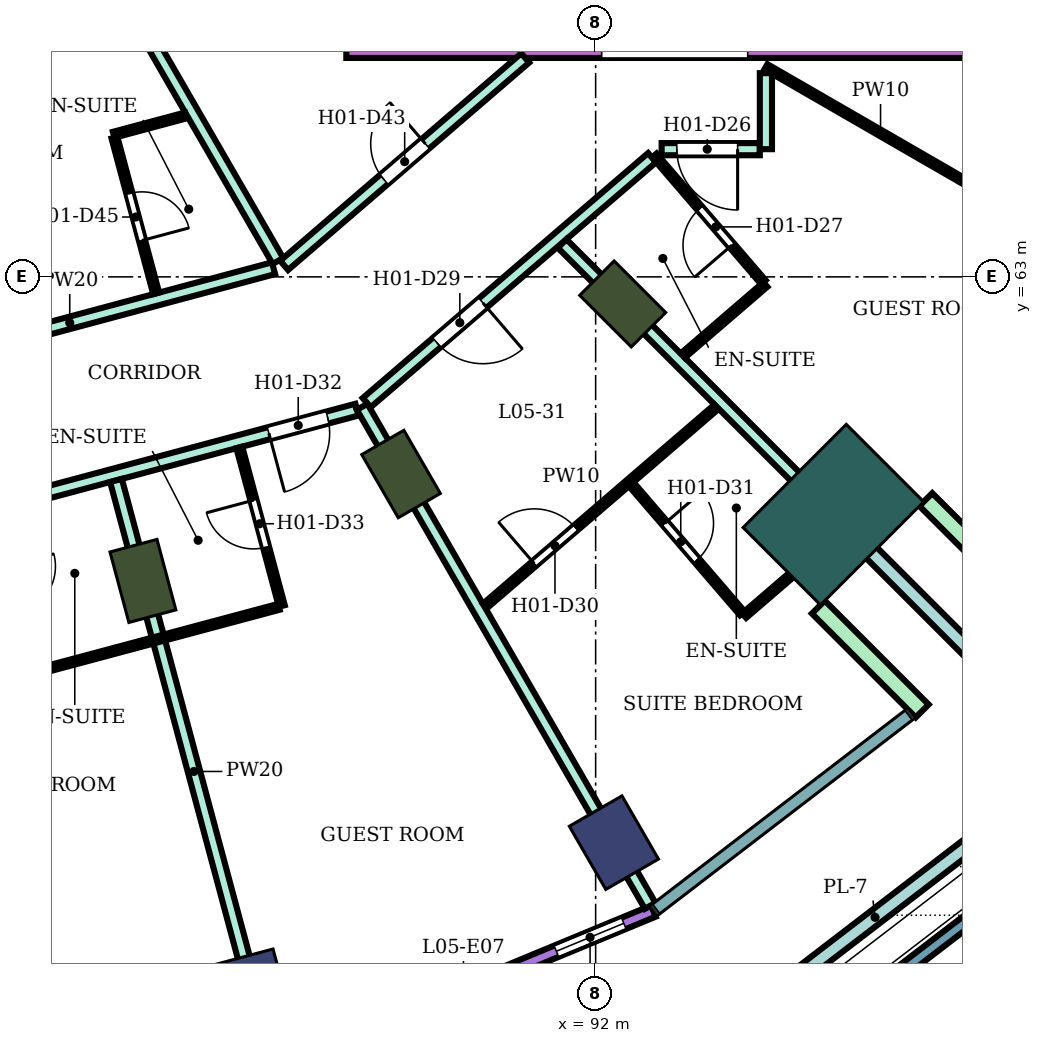
"""IFC4 building model, lengths in metres.
Left out: names, types, materials, properties, quantities, classifications, styles, units other than length and angle.
Written with IfcOpenShell. Run it as: python <this file> out.ifc"""

import sys

from ifc_helpers import new_model, si_unit, direction, frame, frame_2d, origin, origin_2d, place, context, subcontext, project, spatial, rectangle, extrude, element, fill, save


model = new_model("IFC4")
c1 = context("Model", 3, precision=1e-05, world=origin(), true_north=direction((0.0, 1.0)))
c2 = subcontext(c1, "Body", "Model", "MODEL_VIEW")
j1 = project(units=[si_unit("LENGTHUNIT", "METRE"), si_unit("PLANEANGLEUNIT", "RADIAN")], contexts=[c1])
p1 = place(None, origin())
s1 = spatial("IfcSite", under=j1, at=p1, CompositionType="ELEMENT")
p2 = place(p1, origin())
s2 = spatial("IfcBuilding", under=s1, at=p2, CompositionType="ELEMENT")
p3 = place(p2, frame((0.0, 0.0, 28.8)))
s3 = spatial("IfcBuildingStorey", under=s2, at=p3, CompositionType="ELEMENT", Elevation=28.8)
for number, where, z_axis, x_axis in (
    (1, (86.367, 51.238, 0.0), (0.0, 0.0, 1.0), (0.259, -0.966, 0.0)),
    (2, (92.3, 53.696, 0.0), (0.0, 0.0, 1.0), (0.5, -0.866, 0.0)),
):
    element("IfcColumn", number, at=place(p3, frame(where, z_axis=z_axis, x_axis=x_axis)), inside=s3, PredefinedType="COLUMN", context=c2, shape_type="SweptSolid", body=[
        extrude(rectangle(XDim=1.2, YDim=1.0, at=origin_2d()), origin(), (0.0, 0.0, 1.0), 3.8),
    ])
for number, where, z_axis, x_axis in (
    (3, (84.555, 58.0, 0.0), (0.0, 0.0, 1.0), (0.259, -0.966, 0.0)),
    (4, (88.8, 59.758, 0.0), (0.0, 0.0, 1.0), (0.5, -0.866, 0.0)),
    (5, (92.445, 62.555, 0.0), (0.0, 0.0, 1.0), (0.707, -0.707, 0.0)),
):
    element("IfcColumn", number, at=place(p3, frame(where, z_axis=z_axis, x_axis=x_axis)), inside=s3, PredefinedType="COLUMN", context=c2, shape_type="SweptSolid", body=[
        extrude(rectangle(XDim=1.2, YDim=0.8, at=origin_2d()), origin(), (0.0, 0.0, 1.0), 3.8),
    ])
p4 = place(p3, frame((95.91, 59.09, 0.0), z_axis=(0.0, 0.0, 1.0), x_axis=(0.707106781187, -0.707106781187, 0.0)))
e6 = element("IfcColumn", 6, at=p4, inside=s3, PredefinedType="COLUMN", context=c2, shape_type="SweptSolid", body=[
    extrude(rectangle(XDim=1.8, YDim=2.4, at=origin_2d()), origin(), (0.0, 0.0, 1.0), 3.8),
])
p5 = place(p3, frame((87.9, 67.0, 0.0), z_axis=(0.0, 0.0, 1.0), x_axis=(1.0, 0.0, 0.0)))
e7 = element("IfcWall", 7, at=p5, inside=s3, PredefinedType="SHEAR", context=c2, shape_type="SweptSolid", body=[
    extrude(rectangle(XDim=14.7, YDim=0.8, at=frame_2d((7.35, 0.0))), origin(), (0.0, 0.0, 1.0), 3.48),
])
p6 = place(p5, frame((4.2, 0.0, 0.0)))
e8 = element("IfcOpeningElement", 8, at=p6, cuts=e7, PredefinedType="OPENING", context=c2, shape_type="SweptSolid", body=[
    extrude(rectangle(XDim=2.4, YDim=2.4, at=frame_2d((1.2, 1.2))), frame((0.0, 0.41, 0.0), z_axis=(0.0, -1.0, 0.0), x_axis=(1.0, 0.0, 0.0)), (0.0, 0.0, 1.0), 0.82),
])
p7 = place(p3, frame((86.703, 49.983, 0.0), z_axis=(0.0, 0.0, 1.0), x_axis=(0.923875115043, 0.382694096902, 0.0)))
e9 = element("IfcWall", 9, at=p7, inside=s3, PredefinedType="NOTDEFINED", context=c2, shape_type="SweptSolid", body=[
    extrude(rectangle(XDim=6.761, YDim=0.2, at=frame_2d((3.38, 0.0))), origin(), (0.0, 0.0, 1.0), 3.8),
])
p8 = place(p7, frame((0.527, 0.0, 0.9)))
e10 = element("IfcOpeningElement", 10, at=p8, cuts=e9, PredefinedType="OPENING", context=c2, shape_type="SweptSolid", body=[
    extrude(rectangle(XDim=1.2, YDim=2.4, at=frame_2d((0.6, 1.2))), frame((0.0, 0.11, 0.0), z_axis=(0.0, -1.0, 0.0), x_axis=(1.0, 0.0, 0.0)), (0.0, 0.0, 1.0), 0.22),
])
p9 = place(p7, frame((2.48, 0.0, 0.0)))
e11 = element("IfcOpeningElement", 11, at=p9, cuts=e9, PredefinedType="OPENING", context=c2, shape_type="SweptSolid", body=[
    extrude(rectangle(XDim=1.8, YDim=2.4, at=frame_2d((0.9, 1.2))), frame((0.0, 0.11, 0.0), z_axis=(0.0, -1.0, 0.0), x_axis=(1.0, 0.0, 0.0)), (0.0, 0.0, 1.0), 0.22),
])
p10 = place(p7, frame((5.034, 0.0, 0.9)))
e12 = element("IfcOpeningElement", 12, at=p10, cuts=e9, PredefinedType="OPENING", context=c2, shape_type="SweptSolid", body=[
    extrude(rectangle(XDim=1.2, YDim=2.4, at=frame_2d((0.6, 1.2))), frame((0.0, 0.11, 0.0), z_axis=(0.0, -1.0, 0.0), x_axis=(1.0, 0.0, 0.0)), (0.0, 0.0, 1.0), 0.22),
])
for number, where, z_axis, x_axis in (
    (13, (95.662, 57.57, 0.0), (0.0, 0.0, 1.0), (0.707, -0.707, 0.0)),
    (14, (97.43, 59.338, 0.0), (0.0, 0.0, 1.0), (0.707, -0.707, 0.0)),
):
    element("IfcWall", number, at=place(p3, frame(where, z_axis=z_axis, x_axis=x_axis)), inside=s3, PredefinedType="NOTDEFINED", context=c2, shape_type="SweptSolid", body=[
        extrude(rectangle(XDim=2.416, YDim=0.3, at=frame_2d((1.208, 0.0))), origin(), (0.0, 0.0, 1.0), 3.8),
    ])
p11 = place(p3, frame((100.635, 54.346, 0.0), z_axis=(0.0, 0.0, 1.0), x_axis=(-0.793367808682, -0.608742572971, 0.0)))
e15 = element("IfcWall", 15, at=p11, inside=s3, PredefinedType="PARAPET", context=c2, shape_type="SweptSolid", body=[
    extrude(rectangle(XDim=7.596, YDim=0.2, at=frame_2d((3.798, 0.0))), origin(), (0.0, 0.0, 1.0), 1.1),
])
p12 = place(p3, frame((99.067, 54.365, 0.0), z_axis=(0.0, 0.0, 1.0), x_axis=(-0.793355967101, -0.608758005668, 0.0)))
e16 = element("IfcWall", 16, at=p12, inside=s3, PredefinedType="USERDEFINED", context=c2, shape_type="SweptSolid", body=[
    extrude(rectangle(XDim=6.232, YDim=0.25, at=frame_2d((3.116, 0.0))), origin(), (0.0, 0.0, 1.0), 0.6),
])
p13 = place(p3, frame((99.876, 55.124, 0.0), z_axis=(0.0, 0.0, 1.0), x_axis=(-0.707106781187, 0.707106781187, 0.0)))
e17 = element("IfcWall", 17, at=p13, inside=s3, PredefinedType="USERDEFINED", context=c2, shape_type="SweptSolid", body=[
    extrude(rectangle(XDim=4.909, YDim=0.25, at=frame_2d((2.455, 0.0))), origin(), (0.0, 0.0, 1.0), 0.6),
])
p14 = place(p3, frame((80.0, 58.655, 0.0), z_axis=(0.0, 0.0, 1.0), x_axis=(0.965974635626, 0.258636817424, 0.0)))
e18 = element("IfcWall", 18, at=p14, inside=s3, PredefinedType="PARTITIONING", context=c2, shape_type="SweptSolid", body=[
    extrude(rectangle(XDim=8.36, YDim=0.2, at=frame_2d((4.18, 0.0))), origin(), (0.0, 0.0, 1.0), 3.35),
])
p15 = place(p14, frame((6.86, 0.0, 0.0)))
e19 = element("IfcOpeningElement", 19, at=p15, cuts=e18, PredefinedType="OPENING", context=c2, shape_type="SweptSolid", body=[
    extrude(rectangle(XDim=1.0, YDim=2.1, at=frame_2d((0.5, 1.05))), frame((0.0, 0.11, 0.0), z_axis=(0.0, -1.0, 0.0), x_axis=(1.0, 0.0, 0.0)), (0.0, 0.0, 1.0), 0.22),
])
p16 = place(p14, frame((0.55, 0.0, 0.0)))
e20 = element("IfcOpeningElement", 20, at=p16, cuts=e18, PredefinedType="OPENING", context=c2, shape_type="SweptSolid", body=[
    extrude(rectangle(XDim=1.0, YDim=2.1, at=frame_2d((0.5, 1.05))), frame((0.0, 0.11, 0.0), z_axis=(0.0, -1.0, 0.0), x_axis=(1.0, 0.0, 0.0)), (0.0, 0.0, 1.0), 0.22),
])
p17 = place(p3, frame((80.0, 61.346, 0.0), z_axis=(0.0, 0.0, 1.0), x_axis=(0.965924181808, 0.258825182312, 0.0)))
e21 = element("IfcWall", 21, at=p17, inside=s3, PredefinedType="PARTITIONING", context=c2, shape_type="SweptSolid", body=[
    extrude(rectangle(XDim=6.94, YDim=0.2, at=frame_2d((3.47, 0.0))), origin(), (0.0, 0.0, 1.0), 3.35),
])
p18 = place(p17, frame((0.55, 0.0, 0.0)))
e22 = element("IfcOpeningElement", 22, at=p18, cuts=e21, PredefinedType="OPENING", context=c2, shape_type="SweptSolid", body=[
    extrude(rectangle(XDim=1.0, YDim=2.1, at=frame_2d((0.5, 1.05))), frame((0.0, 0.11, 0.0), z_axis=(0.0, -1.0, 0.0), x_axis=(1.0, 0.0, 0.0)), (0.0, 0.0, 1.0), 0.22),
])
p19 = place(p3, frame((83.848, 68.333, 0.0), z_axis=(0.0, 0.0, 1.0), x_axis=(0.499951054106, -0.866053660865, 0.0)))
e23 = element("IfcWall", 23, at=p19, inside=s3, PredefinedType="PARTITIONING", context=c2, shape_type="SweptSolid", body=[
    extrude(rectangle(XDim=5.855, YDim=0.2, at=frame_2d((2.927, 0.0))), origin(), (0.0, 0.0, 1.0), 3.35),
])
p20 = place(p3, frame((84.112, 59.652, 0.0), z_axis=(0.0, 0.0, 1.0), x_axis=(0.258791091927, -0.965933315886, 0.0)))
e24 = element("IfcWall", 24, at=p20, inside=s3, PredefinedType="PARTITIONING", context=c2, shape_type="SweptSolid", body=[
    extrude(rectangle(XDim=9.909, YDim=0.2, at=frame_2d((4.955, 0.0))), origin(), (0.0, 0.0, 1.0), 3.35),
])
p21 = place(p3, frame((86.877, 63.189, 0.0), z_axis=(0.0, 0.0, 1.0), x_axis=(0.758075808328, 0.652166442581, 0.0)))
e25 = element("IfcWall", 25, at=p21, inside=s3, PredefinedType="PARTITIONING", context=c2, shape_type="SweptSolid", body=[
    extrude(rectangle(XDim=5.23, YDim=0.2, at=frame_2d((2.615, 0.0))), origin(), (0.0, 0.0, 1.0), 3.35),
])
p22 = place(p21, frame((2.165, 0.0, 0.0)))
e26 = element("IfcOpeningElement", 26, at=p22, cuts=e25, PredefinedType="OPENING", context=c2, shape_type="SweptSolid", body=[
    extrude(rectangle(XDim=0.9, YDim=2.1, at=frame_2d((0.45, 1.05))), frame((0.0, 0.11, 0.0), z_axis=(0.0, -1.0, 0.0), x_axis=(1.0, 0.0, 0.0)), (0.0, 0.0, 1.0), 0.22),
])
p23 = place(p3, frame((88.235, 60.931, 0.0), z_axis=(0.0, 0.0, 1.0), x_axis=(0.758799498714, 0.651324282329, 0.0)))
e27 = element("IfcWall", 27, at=p23, inside=s3, PredefinedType="PARTITIONING", context=c2, shape_type="SweptSolid", body=[
    extrude(rectangle(XDim=6.186, YDim=0.2, at=frame_2d((3.093, 0.0))), origin(), (0.0, 0.0, 1.0), 3.35),
])
p24 = place(p23, frame((1.519, 0.0, 0.0)))
e28 = element("IfcOpeningElement", 28, at=p24, cuts=e27, PredefinedType="OPENING", context=c2, shape_type="SweptSolid", body=[
    extrude(rectangle(XDim=1.0, YDim=2.1, at=frame_2d((0.5, 1.05))), frame((0.0, 0.11, 0.0), z_axis=(0.0, -1.0, 0.0), x_axis=(1.0, 0.0, 0.0)), (0.0, 0.0, 1.0), 0.22),
])
p25 = place(p3, frame((88.16, 60.863, 0.0), z_axis=(0.0, 0.0, 1.0), x_axis=(0.499946996988, -0.866056002925, 0.0)))
e29 = element("IfcWall", 29, at=p25, inside=s3, PredefinedType="PARTITIONING", context=c2, shape_type="SweptSolid", body=[
    extrude(rectangle(XDim=9.475, YDim=0.2, at=frame_2d((4.737, 0.0))), origin(), (0.0, 0.0, 1.0), 3.35),
])
p26 = place(p3, frame((91.449, 63.548, 0.0), z_axis=(0.0, 0.0, 1.0), x_axis=(0.706984804638, -0.707228736698, 0.0)))
e30 = element("IfcWall", 30, at=p26, inside=s3, PredefinedType="PARTITIONING", context=c2, shape_type="SweptSolid", body=[
    extrude(rectangle(XDim=7.006, YDim=0.2, at=frame_2d((3.503, 0.0))), origin(), (0.0, 0.0, 1.0), 3.35),
])
p27 = place(p3, frame((93.085, 65.1, 0.0), z_axis=(0.0, 0.0, 1.0), x_axis=(1.0, 0.0, 0.0)))
e31 = element("IfcWall", 31, at=p27, inside=s3, PredefinedType="PARTITIONING", context=c2, shape_type="SweptSolid", body=[
    extrude(rectangle(XDim=1.615, YDim=0.2, at=frame_2d((0.808, 0.0))), origin(), (0.0, 0.0, 1.0), 3.35),
])
p28 = place(p27, frame((0.25, 0.0, 0.0)))
e32 = element("IfcOpeningElement", 32, at=p28, cuts=e31, PredefinedType="OPENING", context=c2, shape_type="SweptSolid", body=[
    extrude(rectangle(XDim=1.0, YDim=2.1, at=frame_2d((0.5, 1.05))), frame((0.0, 0.11, 0.0), z_axis=(0.0, -1.0, 0.0), x_axis=(1.0, 0.0, 0.0)), (0.0, 0.0, 1.0), 0.22),
])
p29 = place(p3, frame((94.8, 65.1, 0.0), z_axis=(0.0, 0.0, 1.0), x_axis=(0.0, 1.0, 0.0)))
e33 = element("IfcWall", 33, at=p29, inside=s3, PredefinedType="PARTITIONING", context=c2, shape_type="SweptSolid", body=[
    extrude(rectangle(XDim=1.25, YDim=0.2, at=frame_2d((0.625, 0.0))), origin(), (0.0, 0.0, 1.0), 3.35),
])
p30 = place(p3, frame((82.782, 56.501, 0.0), z_axis=(0.0, 0.0, 1.0), x_axis=(0.965999228418, 0.258544949083, 0.0)))
e34 = element("IfcWall", 34, at=p30, inside=s3, PredefinedType="PARTITIONING", context=c2, shape_type="SweptSolid", body=[
    extrude(rectangle(XDim=4.15, YDim=0.1, at=frame_2d((2.075, 0.0))), origin(), (0.0, 0.0, 1.0), 3.35),
])
p31 = place(p3, frame((84.087, 65.289, 0.0), z_axis=(0.0, 0.0, 1.0), x_axis=(0.258929459649, -0.965896234037, 0.0)))
e35 = element("IfcWall", 35, at=p31, inside=s3, PredefinedType="PARTITIONING", context=c2, shape_type="SweptSolid", body=[
    extrude(rectangle(XDim=2.65, YDim=0.1, at=frame_2d((1.325, 0.0))), origin(), (0.0, 0.0, 1.0), 3.35),
])
p32 = place(p31, frame((0.95, 0.0, 0.0)))
e36 = element("IfcOpeningElement", 36, at=p32, cuts=e35, PredefinedType="OPENING", context=c2, shape_type="SweptSolid", body=[
    extrude(rectangle(XDim=0.8, YDim=2.1, at=frame_2d((0.4, 1.05))), frame((0.0, 0.06, 0.0), z_axis=(0.0, -1.0, 0.0), x_axis=(1.0, 0.0, 0.0)), (0.0, 0.0, 1.0), 0.12),
])
p33 = place(p3, frame((84.074, 65.337, 0.0), z_axis=(0.0, 0.0, 1.0), x_axis=(0.965914351064, 0.258861867428, 0.0)))
e37 = element("IfcWall", 37, at=p33, inside=s3, PredefinedType="PARTITIONING", context=c2, shape_type="SweptSolid", body=[
    extrude(rectangle(XDim=1.229, YDim=0.1, at=frame_2d((0.615, 0.0))), origin(), (0.0, 0.0, 1.0), 3.35),
])
p34 = place(p3, frame((86.14, 60.196, 0.0), z_axis=(0.0, 0.0, 1.0), x_axis=(0.258945475746, -0.965891940432, 0.0)))
e38 = element("IfcWall", 38, at=p34, inside=s3, PredefinedType="PARTITIONING", context=c2, shape_type="SweptSolid", body=[
    extrude(rectangle(XDim=2.7, YDim=0.1, at=frame_2d((1.35, 0.0))), origin(), (0.0, 0.0, 1.0), 3.35),
])
p35 = place(p34, frame((0.9, 0.0, 0.0)))
e39 = element("IfcOpeningElement", 39, at=p35, cuts=e38, PredefinedType="OPENING", context=c2, shape_type="SweptSolid", body=[
    extrude(rectangle(XDim=0.8, YDim=2.1, at=frame_2d((0.4, 1.05))), frame((0.0, 0.06, 0.0), z_axis=(0.0, -1.0, 0.0), x_axis=(1.0, 0.0, 0.0)), (0.0, 0.0, 1.0), 0.12),
])
p36 = place(p3, frame((90.178, 57.587, 0.0), z_axis=(0.0, 0.0, 1.0), x_axis=(0.758140003227, 0.652091815243, 0.0)))
e40 = element("IfcWall", 40, at=p36, inside=s3, PredefinedType="PARTITIONING", context=c2, shape_type="SweptSolid", body=[
    extrude(rectangle(XDim=5.021, YDim=0.1, at=frame_2d((2.51, 0.0))), origin(), (0.0, 0.0, 1.0), 3.35),
])
p37 = place(p36, frame((1.071, 0.0, 0.0)))
e41 = element("IfcOpeningElement", 41, at=p37, cuts=e40, PredefinedType="OPENING", context=c2, shape_type="SweptSolid", body=[
    extrude(rectangle(XDim=0.9, YDim=2.1, at=frame_2d((0.45, 1.05))), frame((0.0, 0.06, 0.0), z_axis=(0.0, -1.0, 0.0), x_axis=(1.0, 0.0, 0.0)), (0.0, 0.0, 1.0), 0.12),
])
p38 = place(p3, frame((92.585, 59.591, 0.0), z_axis=(0.0, 0.0, 1.0), x_axis=(0.652011200591, -0.758209334092, 0.0)))
e42 = element("IfcWall", 42, at=p38, inside=s3, PredefinedType="PARTITIONING", context=c2, shape_type="SweptSolid", body=[
    extrude(rectangle(XDim=2.8, YDim=0.1, at=frame_2d((1.4, 0.0))), origin(), (0.0, 0.0, 1.0), 3.35),
])
p39 = place(p38, frame((0.85, 0.0, 0.0)))
e43 = element("IfcOpeningElement", 43, at=p39, cuts=e42, PredefinedType="OPENING", context=c2, shape_type="SweptSolid", body=[
    extrude(rectangle(XDim=0.8, YDim=2.1, at=frame_2d((0.4, 1.05))), frame((0.0, 0.06, 0.0), z_axis=(0.0, -1.0, 0.0), x_axis=(1.0, 0.0, 0.0)), (0.0, 0.0, 1.0), 0.12),
])
p40 = place(p3, frame((92.965, 64.997, 0.0), z_axis=(0.0, 0.0, 1.0), x_axis=(0.652069888227, -0.758158862553, 0.0)))
e44 = element("IfcWall", 44, at=p40, inside=s3, PredefinedType="PARTITIONING", context=c2, shape_type="SweptSolid", body=[
    extrude(rectangle(XDim=2.75, YDim=0.1, at=frame_2d((1.375, 0.0))), origin(), (0.0, 0.0, 1.0), 3.35),
])
p41 = place(p40, frame((1.15, 0.0, 0.0)))
e45 = element("IfcOpeningElement", 45, at=p41, cuts=e44, PredefinedType="OPENING", context=c2, shape_type="SweptSolid", body=[
    extrude(rectangle(XDim=0.8, YDim=2.1, at=frame_2d((0.4, 1.05))), frame((0.0, 0.06, 0.0), z_axis=(0.0, -1.0, 0.0), x_axis=(1.0, 0.0, 0.0)), (0.0, 0.0, 1.0), 0.12),
])
p42 = place(p3, frame((93.435, 61.707, 0.0), z_axis=(0.0, 0.0, 1.0), x_axis=(0.758070495124, 0.652172618578, 0.0)))
e46 = element("IfcWall", 46, at=p42, inside=s3, PredefinedType="PARTITIONING", context=c2, shape_type="SweptSolid", body=[
    extrude(rectangle(XDim=1.789, YDim=0.1, at=frame_2d((0.895, 0.0))), origin(), (0.0, 0.0, 1.0), 3.35),
])
p43 = place(p3, frame((94.443, 57.43, 0.0), z_axis=(0.0, 0.0, 1.0), x_axis=(0.757840386328, 0.65243999636, 0.0)))
e47 = element("IfcWall", 47, at=p43, inside=s3, PredefinedType="PARTITIONING", context=c2, shape_type="SweptSolid", body=[
    extrude(rectangle(XDim=2.108, YDim=0.1, at=frame_2d((1.054, 0.0))), origin(), (0.0, 0.0, 1.0), 3.35),
])
p44 = place(p3, frame((94.8, 66.455, 0.0), z_axis=(0.0, 0.0, 1.0), x_axis=(0.86602264145, -0.500004784474, 0.0)))
e48 = element("IfcWall", 48, at=p44, inside=s3, PredefinedType="PARTITIONING", context=c2, shape_type="SweptSolid", body=[
    extrude(rectangle(XDim=8.708, YDim=0.1, at=frame_2d((4.354, 0.0))), origin(), (0.0, 0.0, 1.0), 3.35),
])
p45 = place(p44, frame((3.879, 0.0, 0.0)))
e49 = element("IfcOpeningElement", 49, at=p45, cuts=e48, PredefinedType="OPENING", context=c2, shape_type="SweptSolid", body=[
    extrude(rectangle(XDim=0.9, YDim=2.1, at=frame_2d((0.45, 1.05))), frame((0.0, 0.06, 0.0), z_axis=(0.0, -1.0, 0.0), x_axis=(1.0, 0.0, 0.0)), (0.0, 0.0, 1.0), 0.12),
])
p46 = place(p10, origin())
e50 = element("IfcWindow", 50, at=p46, inside=s3, PartitioningType="SINGLE_PANEL", PredefinedType="WINDOW", context=c2, shape_type="SweptSolid", body=[
    extrude(rectangle(XDim=1.2, YDim=2.4, at=frame_2d((0.6, 1.2))), frame((0.0, 0.03, 0.0), z_axis=(0.0, -1.0, 0.0), x_axis=(1.0, 0.0, 0.0)), (0.0, 0.0, 1.0), 0.06),
])
fill(e12, e50)
p47 = place(p28, frame((1.0, 0.0, 0.0), z_axis=(0.0, 0.0, 1.0), x_axis=(-1.0, 0.0, 0.0)))
e51 = element("IfcDoor", 51, at=p47, inside=s3, OperationType="SINGLE_SWING_LEFT", PredefinedType="DOOR", context=c2, shape_type="SweptSolid", body=[
    extrude(rectangle(XDim=1.0, YDim=2.1, at=frame_2d((0.5, 1.05))), frame((0.0, 0.025, 0.0), z_axis=(0.0, -1.0, 0.0), x_axis=(1.0, 0.0, 0.0)), (0.0, 0.0, 1.0), 0.05),
])
fill(e32, e51)
p48 = place(p41, frame((0.8, 0.0, 0.0), z_axis=(0.0, 0.0, 1.0), x_axis=(-1.0, 0.0, 0.0)))
e52 = element("IfcDoor", 52, at=p48, inside=s3, OperationType="SINGLE_SWING_LEFT", PredefinedType="DOOR", context=c2, shape_type="SweptSolid", body=[
    extrude(rectangle(XDim=0.8, YDim=2.1, at=frame_2d((0.4, 1.05))), frame((0.0, 0.025, 0.0), z_axis=(0.0, -1.0, 0.0), x_axis=(1.0, 0.0, 0.0)), (0.0, 0.0, 1.0), 0.05),
])
fill(e45, e52)
p49 = place(p24, frame((1.0, 0.0, 0.0), z_axis=(0.0, 0.0, 1.0), x_axis=(-1.0, 0.0, 0.0)))
e53 = element("IfcDoor", 53, at=p49, inside=s3, OperationType="SINGLE_SWING_LEFT", PredefinedType="DOOR", context=c2, shape_type="SweptSolid", body=[
    extrude(rectangle(XDim=1.0, YDim=2.1, at=frame_2d((0.5, 1.05))), frame((0.0, 0.025, 0.0), z_axis=(0.0, -1.0, 0.0), x_axis=(1.0, 0.0, 0.0)), (0.0, 0.0, 1.0), 0.05),
])
fill(e28, e53)
p50 = place(p37, origin())
e54 = element("IfcDoor", 54, at=p50, inside=s3, OperationType="SINGLE_SWING_LEFT", PredefinedType="DOOR", context=c2, shape_type="SweptSolid", body=[
    extrude(rectangle(XDim=0.9, YDim=2.1, at=frame_2d((0.45, 1.05))), frame((0.0, 0.025, 0.0), z_axis=(0.0, -1.0, 0.0), x_axis=(1.0, 0.0, 0.0)), (0.0, 0.0, 1.0), 0.05),
])
fill(e41, e54)
p51 = place(p39, origin())
e55 = element("IfcDoor", 55, at=p51, inside=s3, OperationType="SINGLE_SWING_LEFT", PredefinedType="DOOR", context=c2, shape_type="SweptSolid", body=[
    extrude(rectangle(XDim=0.8, YDim=2.1, at=frame_2d((0.4, 1.05))), frame((0.0, 0.025, 0.0), z_axis=(0.0, -1.0, 0.0), x_axis=(1.0, 0.0, 0.0)), (0.0, 0.0, 1.0), 0.05),
])
fill(e43, e55)
p52 = place(p15, frame((1.0, 0.0, 0.0), z_axis=(0.0, 0.0, 1.0), x_axis=(-1.0, 0.0, 0.0)))
e56 = element("IfcDoor", 56, at=p52, inside=s3, OperationType="SINGLE_SWING_RIGHT", PredefinedType="DOOR", context=c2, shape_type="SweptSolid", body=[
    extrude(rectangle(XDim=1.0, YDim=2.1, at=frame_2d((0.5, 1.05))), frame((0.0, 0.025, 0.0), z_axis=(0.0, -1.0, 0.0), x_axis=(1.0, 0.0, 0.0)), (0.0, 0.0, 1.0), 0.05),
])
fill(e19, e56)
p53 = place(p35, frame((0.8, 0.0, 0.0), z_axis=(0.0, 0.0, 1.0), x_axis=(-1.0, 0.0, 0.0)))
e57 = element("IfcDoor", 57, at=p53, inside=s3, OperationType="SINGLE_SWING_RIGHT", PredefinedType="DOOR", context=c2, shape_type="SweptSolid", body=[
    extrude(rectangle(XDim=0.8, YDim=2.1, at=frame_2d((0.4, 1.05))), frame((0.0, 0.025, 0.0), z_axis=(0.0, -1.0, 0.0), x_axis=(1.0, 0.0, 0.0)), (0.0, 0.0, 1.0), 0.05),
])
fill(e39, e57)
p54 = place(p22, origin())
e58 = element("IfcDoor", 58, at=p54, inside=s3, OperationType="SINGLE_SWING_RIGHT", PredefinedType="DOOR", context=c2, shape_type="SweptSolid", body=[
    extrude(rectangle(XDim=0.9, YDim=2.1, at=frame_2d((0.45, 1.05))), frame((0.0, 0.025, 0.0), z_axis=(0.0, -1.0, 0.0), x_axis=(1.0, 0.0, 0.0)), (0.0, 0.0, 1.0), 0.05),
])
fill(e26, e58)
p55 = place(p32, origin())
e59 = element("IfcDoor", 59, at=p55, inside=s3, OperationType="SINGLE_SWING_RIGHT", PredefinedType="DOOR", context=c2, shape_type="SweptSolid", body=[
    extrude(rectangle(XDim=0.8, YDim=2.1, at=frame_2d((0.4, 1.05))), frame((0.0, 0.025, 0.0), z_axis=(0.0, -1.0, 0.0), x_axis=(1.0, 0.0, 0.0)), (0.0, 0.0, 1.0), 0.05),
])
fill(e36, e59)
save(model, sys.argv[1])
